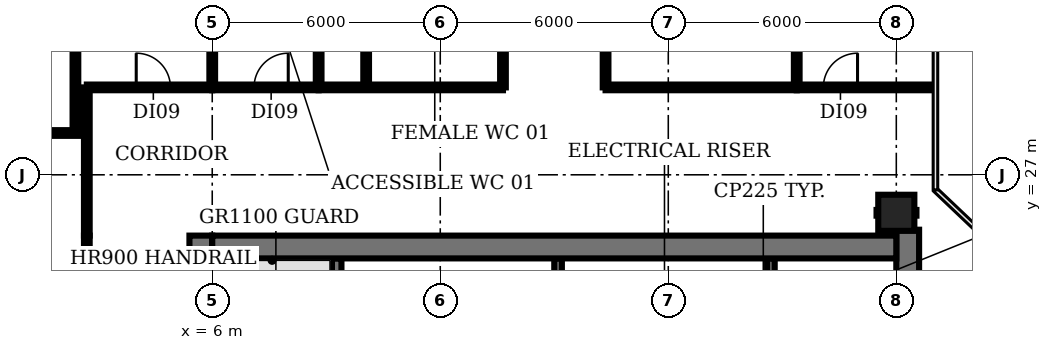
"""IFC4 building model, lengths in metres.
Left out: names, types, materials, properties, quantities, classifications, styles, units other than length and angle.
Written with IfcOpenShell. Run it as: python <this file> out.ifc"""

import sys

from ifc_helpers import new_model, si_unit, direction, frame, frame_2d, origin, origin_2d, place, context, subcontext, project, spatial, rectangle, circle, extrude, element, fill, save


model = new_model("IFC4")
c1 = context("Model", 3, precision=1e-05, world=origin(), true_north=direction((0.0, 1.0)))
c2 = subcontext(c1, "Body", "Model", "MODEL_VIEW")
j1 = project(units=[si_unit("LENGTHUNIT", "METRE"), si_unit("PLANEANGLEUNIT", "RADIAN")], contexts=[c1])
p1 = place(None, origin())
s1 = spatial("IfcSite", under=j1, at=p1, CompositionType="ELEMENT")
p2 = place(p1, origin())
s2 = spatial("IfcBuilding", under=s1, at=p2, CompositionType="ELEMENT")
p3 = place(p2, frame((0.0, 0.0, 176.0)))
s3 = spatial("IfcBuildingStorey", under=s2, at=p3, CompositionType="ELEMENT", Elevation=176.0)
p4 = place(p3, frame((24.0, 26.0, 0.0), z_axis=(0.0, 0.0, 1.0), x_axis=(1.0, 0.0, 0.0)))
e1 = element("IfcColumn", 1, at=p4, inside=s3, PredefinedType="COLUMN", context=c2, shape_type="SweptSolid", body=[
    extrude(circle(Radius=0.475, at=origin_2d()), origin(), (0.0, 0.0, 1.0), 3.85),
])
p5 = place(p3, frame((9.275, 18.375, 0.0), z_axis=(0.0, 0.0, 1.0), x_axis=(0.0, 1.0, 0.0)))
e2 = element("IfcWall", 2, at=p5, inside=s3, PredefinedType="SHEAR", context=c2, shape_type="SweptSolid", body=[
    extrude(rectangle(XDim=6.425, YDim=0.25, at=frame_2d((3.212, 0.0))), origin(), (0.0, 0.0, 1.0), 3.85),
])
for number, where, z_axis, x_axis in (
    (3, (15.1, 22.9, 0.0), (0.0, 0.0, 1.0), (0.0, 1.0, 0.0)),
    (4, (20.7, 22.9, 0.0), (0.0, 0.0, 1.0), (0.0, 1.0, 0.0)),
):
    element("IfcWall", number, at=place(p3, frame(where, z_axis=z_axis, x_axis=x_axis)), inside=s3, PredefinedType="SHEAR", context=c2, shape_type="SweptSolid", body=[
        extrude(rectangle(XDim=1.9, YDim=0.2, at=frame_2d((0.95, 0.0))), origin(), (0.0, 0.0, 1.0), 3.85),
    ])
p6 = place(p3, frame((5.7, 4.8, 0.0), z_axis=(0.0, 0.0, 1.0), x_axis=(0.0, 1.0, 0.0)))
e5 = element("IfcWall", 5, at=p6, inside=s3, PredefinedType="SHEAR", context=c2, shape_type="SweptSolid", body=[
    extrude(rectangle(XDim=20.6, YDim=0.6, at=frame_2d((10.3, 0.0))), origin(), (0.0, 0.0, 1.0), 3.85),
])
p7 = place(p6, frame((0.85, 0.0, 0.0)))
e6 = element("IfcOpeningElement", 6, at=p7, cuts=e5, PredefinedType="OPENING", context=c2, shape_type="SweptSolid", body=[
    extrude(rectangle(XDim=1.5, YDim=2.1, at=frame_2d((0.75, 1.05))), frame((0.0, 0.31, 0.0), z_axis=(0.0, -1.0, 0.0), x_axis=(1.0, 0.0, 0.0)), (0.0, 0.0, 1.0), 0.62),
])
p8 = place(p6, frame((7.3, 0.0, 0.0)))
e7 = element("IfcOpeningElement", 7, at=p8, cuts=e5, PredefinedType="OPENING", context=c2, shape_type="SweptSolid", body=[
    extrude(rectangle(XDim=1.2, YDim=2.1, at=frame_2d((0.6, 1.05))), frame((0.0, 0.31, 0.0), z_axis=(0.0, -1.0, 0.0), x_axis=(1.0, 0.0, 0.0)), (0.0, 0.0, 1.0), 0.62),
])
p9 = place(p6, frame((13.85, 0.0, 0.0)))
e8 = element("IfcOpeningElement", 8, at=p9, cuts=e5, PredefinedType="OPENING", context=c2, shape_type="SweptSolid", body=[
    extrude(rectangle(XDim=1.2, YDim=2.1, at=frame_2d((0.6, 1.05))), frame((0.0, 0.31, 0.0), z_axis=(0.0, -1.0, 0.0), x_axis=(1.0, 0.0, 0.0)), (0.0, 0.0, 1.0), 0.62),
])
p10 = place(p3, frame((24.3, 25.555, 0.0), z_axis=(0.0, 0.0, 1.0), x_axis=(0.0, -1.0, 0.0)))
e9 = element("IfcWall", 9, at=p10, inside=s3, PredefinedType="SHEAR", context=c2, shape_type="SweptSolid", body=[
    extrude(rectangle(XDim=20.755, YDim=0.6, at=frame_2d((10.377, 0.0))), origin(), (0.0, 0.0, 1.0), 3.85),
])
p11 = place(p10, frame((18.405, 0.0, 0.0)))
e10 = element("IfcOpeningElement", 10, at=p11, cuts=e9, PredefinedType="OPENING", context=c2, shape_type="SweptSolid", body=[
    extrude(rectangle(XDim=1.5, YDim=2.1, at=frame_2d((0.75, 1.05))), frame((0.0, 0.31, 0.0), z_axis=(0.0, -1.0, 0.0), x_axis=(1.0, 0.0, 0.0)), (0.0, 0.0, 1.0), 0.62),
])
p12 = place(p10, frame((12.305, 0.0, 0.0)))
e11 = element("IfcOpeningElement", 11, at=p12, cuts=e9, PredefinedType="OPENING", context=c2, shape_type="SweptSolid", body=[
    extrude(rectangle(XDim=0.9, YDim=2.1, at=frame_2d((0.45, 1.05))), frame((0.0, 0.31, 0.0), z_axis=(0.0, -1.0, 0.0), x_axis=(1.0, 0.0, 0.0)), (0.0, 0.0, 1.0), 0.62),
])
p13 = place(p10, frame((6.305, 0.0, 0.0)))
e12 = element("IfcOpeningElement", 12, at=p13, cuts=e9, PredefinedType="OPENING", context=c2, shape_type="SweptSolid", body=[
    extrude(rectangle(XDim=2.0, YDim=2.1, at=frame_2d((1.0, 1.05))), frame((0.0, 0.31, 0.0), z_axis=(0.0, -1.0, 0.0), x_axis=(1.0, 0.0, 0.0)), (0.0, 0.0, 1.0), 0.62),
])
p14 = place(p3, frame((6.0, 25.1, 0.0), z_axis=(0.0, 0.0, 1.0), x_axis=(1.0, 0.0, 0.0)))
e13 = element("IfcWall", 13, at=p14, inside=s3, PredefinedType="SHEAR", context=c2, shape_type="SweptSolid", body=[
    extrude(rectangle(XDim=18.0, YDim=0.6, at=frame_2d((9.0, 0.0))), origin(), (0.0, 0.0, 1.0), 3.85),
])
p15 = place(p3, frame((-0.969, 28.1, 0.0), z_axis=(0.0, 0.0, 1.0), x_axis=(1.0, 0.0, 0.0)))
e14 = element("IfcWall", 14, at=p15, inside=s3, PredefinedType="PARTITIONING", context=c2, shape_type="SweptSolid", body=[
    extrude(rectangle(XDim=3.669, YDim=0.15, at=frame_2d((1.834, 0.0))), origin(), (0.0, 0.0, 1.0), 2.88),
])
p16 = place(p3, frame((2.4, 28.1, 0.0), z_axis=(0.0, 0.0, 1.0), x_axis=(0.0, 1.0, 0.0)))
e15 = element("IfcWall", 15, at=p16, inside=s3, PredefinedType="PARTITIONING", context=c2, shape_type="SweptSolid", body=[
    extrude(rectangle(XDim=6.0, YDim=0.15, at=frame_2d((3.0, 0.0))), origin(), (0.0, 0.0, 1.0), 2.88),
])
p17 = place(p3, frame((2.7, 4.8, 0.0), z_axis=(0.0, 0.0, 1.0), x_axis=(0.0, 1.0, 0.0)))
e16 = element("IfcWall", 16, at=p17, inside=s3, PredefinedType="PARTITIONING", context=c2, shape_type="SweptSolid", body=[
    extrude(rectangle(XDim=20.6, YDim=0.15, at=frame_2d((10.3, 0.0))), origin(), (0.0, 0.0, 1.0), 2.88),
])
p18 = place(p17, frame((10.2, 0.0, 0.0)))
e17 = element("IfcOpeningElement", 17, at=p18, cuts=e16, PredefinedType="OPENING", context=c2, shape_type="SweptSolid", body=[
    extrude(rectangle(XDim=1.2, YDim=2.1, at=frame_2d((0.6, 1.05))), frame((0.0, 0.085, 0.0), z_axis=(0.0, -1.0, 0.0), x_axis=(1.0, 0.0, 0.0)), (0.0, 0.0, 1.0), 0.17),
])
p19 = place(p3, frame((2.7, 25.4, 0.0), z_axis=(0.0, 0.0, 1.0), x_axis=(0.0, 1.0, 0.0)))
e18 = element("IfcWall", 18, at=p19, inside=s3, PredefinedType="PARTITIONING", context=c2, shape_type="SweptSolid", body=[
    extrude(rectangle(XDim=3.9, YDim=0.15, at=frame_2d((1.95, 0.0))), origin(), (0.0, 0.0, 1.0), 2.88),
])
p20 = place(p3, frame((2.7, 29.3, 0.0), z_axis=(0.0, 0.0, 1.0), x_axis=(1.0, 0.0, 0.0)))
e19 = element("IfcWall", 19, at=p20, inside=s3, PredefinedType="PARTITIONING", context=c2, shape_type="SweptSolid", body=[
    extrude(rectangle(XDim=3.3, YDim=0.15, at=frame_2d((1.65, 0.0))), origin(), (0.0, 0.0, 1.0), 2.88),
])
p21 = place(p20, frame((1.3, 0.0, 0.0)))
e20 = element("IfcOpeningElement", 20, at=p21, cuts=e19, PredefinedType="OPENING", context=c2, shape_type="SweptSolid", body=[
    extrude(rectangle(XDim=0.9, YDim=2.1, at=frame_2d((0.45, 1.05))), frame((0.0, 0.085, 0.0), z_axis=(0.0, -1.0, 0.0), x_axis=(1.0, 0.0, 0.0)), (0.0, 0.0, 1.0), 0.17),
])
p22 = place(p3, frame((6.0, 29.3, 0.0), z_axis=(0.0, 0.0, 1.0), x_axis=(0.0, 1.0, 0.0)))
e21 = element("IfcWall", 21, at=p22, inside=s3, PredefinedType="PARTITIONING", context=c2, shape_type="SweptSolid", body=[
    extrude(rectangle(XDim=4.8, YDim=0.15, at=frame_2d((2.4, 0.0))), origin(), (0.0, 0.0, 1.0), 2.88),
])
p23 = place(p3, frame((6.0, 29.3, 0.0), z_axis=(0.0, 0.0, 1.0), x_axis=(1.0, 0.0, 0.0)))
e22 = element("IfcWall", 22, at=p23, inside=s3, PredefinedType="PARTITIONING", context=c2, shape_type="SweptSolid", body=[
    extrude(rectangle(XDim=2.8, YDim=0.15, at=frame_2d((1.4, 0.0))), origin(), (0.0, 0.0, 1.0), 2.88),
])
p24 = place(p23, frame((1.1, 0.0, 0.0)))
e23 = element("IfcOpeningElement", 23, at=p24, cuts=e22, PredefinedType="OPENING", context=c2, shape_type="SweptSolid", body=[
    extrude(rectangle(XDim=0.9, YDim=2.1, at=frame_2d((0.45, 1.05))), frame((0.0, 0.085, 0.0), z_axis=(0.0, -1.0, 0.0), x_axis=(1.0, 0.0, 0.0)), (0.0, 0.0, 1.0), 0.17),
])
p25 = place(p3, frame((8.8, 29.3, 0.0), z_axis=(0.0, 0.0, 1.0), x_axis=(0.0, 1.0, 0.0)))
e24 = element("IfcWall", 24, at=p25, inside=s3, PredefinedType="PARTITIONING", context=c2, shape_type="SweptSolid", body=[
    extrude(rectangle(XDim=4.8, YDim=0.15, at=frame_2d((2.4, 0.0))), origin(), (0.0, 0.0, 1.0), 2.88),
])
p26 = place(p3, frame((8.8, 29.3, 0.0), z_axis=(0.0, 0.0, 1.0), x_axis=(1.0, 0.0, 0.0)))
e25 = element("IfcWall", 25, at=p26, inside=s3, PredefinedType="PARTITIONING", context=c2, shape_type="SweptSolid", body=[
    extrude(rectangle(XDim=4.85, YDim=0.15, at=frame_2d((2.425, 0.0))), origin(), (0.0, 0.0, 1.0), 2.88),
])
p27 = place(p3, frame((10.05, 29.3, 0.0), z_axis=(0.0, 0.0, 1.0), x_axis=(0.0, 1.0, 0.0)))
e26 = element("IfcWall", 26, at=p27, inside=s3, PredefinedType="PARTITIONING", context=c2, shape_type="SweptSolid", body=[
    extrude(rectangle(XDim=4.8, YDim=0.15, at=frame_2d((2.4, 0.0))), origin(), (0.0, 0.0, 1.0), 2.88),
])
p28 = place(p3, frame((13.65, 29.3, 0.0), z_axis=(0.0, 0.0, 1.0), x_axis=(0.0, 1.0, 0.0)))
e27 = element("IfcWall", 27, at=p28, inside=s3, PredefinedType="PARTITIONING", context=c2, shape_type="SweptSolid", body=[
    extrude(rectangle(XDim=4.8, YDim=0.15, at=frame_2d((2.4, 0.0))), origin(), (0.0, 0.0, 1.0), 2.88),
])
p29 = place(p28, frame((1.9, 0.0, 0.0)))
e28 = element("IfcOpeningElement", 28, at=p29, cuts=e27, PredefinedType="OPENING", context=c2, shape_type="SweptSolid", body=[
    extrude(rectangle(XDim=0.9, YDim=2.1, at=frame_2d((0.45, 1.05))), frame((0.0, 0.085, 0.0), z_axis=(0.0, -1.0, 0.0), x_axis=(1.0, 0.0, 0.0)), (0.0, 0.0, 1.0), 0.17),
])
p30 = place(p3, frame((16.35, 29.3, 0.0), z_axis=(0.0, 0.0, 1.0), x_axis=(0.0, 1.0, 0.0)))
e29 = element("IfcWall", 29, at=p30, inside=s3, PredefinedType="PARTITIONING", context=c2, shape_type="SweptSolid", body=[
    extrude(rectangle(XDim=4.8, YDim=0.15, at=frame_2d((2.4, 0.0))), origin(), (0.0, 0.0, 1.0), 2.88),
])
p31 = place(p3, frame((16.35, 29.3, 0.0), z_axis=(0.0, 0.0, 1.0), x_axis=(1.0, 0.0, 0.0)))
e30 = element("IfcWall", 30, at=p31, inside=s3, PredefinedType="PARTITIONING", context=c2, shape_type="SweptSolid", body=[
    extrude(rectangle(XDim=5.03, YDim=0.15, at=frame_2d((2.515, 0.0))), origin(), (0.0, 0.0, 1.0), 2.88),
])
p32 = place(p3, frame((21.38, 29.3, 0.0), z_axis=(0.0, 0.0, 1.0), x_axis=(0.0, 1.0, 0.0)))
e31 = element("IfcWall", 31, at=p32, inside=s3, PredefinedType="PARTITIONING", context=c2, shape_type="SweptSolid", body=[
    extrude(rectangle(XDim=4.8, YDim=0.15, at=frame_2d((2.4, 0.0))), origin(), (0.0, 0.0, 1.0), 2.88),
])
p33 = place(p3, frame((21.38, 29.3, 0.0), z_axis=(0.0, 0.0, 1.0), x_axis=(1.0, 0.0, 0.0)))
e32 = element("IfcWall", 32, at=p33, inside=s3, PredefinedType="PARTITIONING", context=c2, shape_type="SweptSolid", body=[
    extrude(rectangle(XDim=3.6, YDim=0.15, at=frame_2d((1.8, 0.0))), origin(), (0.0, 0.0, 1.0), 2.88),
])
p34 = place(p33, frame((0.7, 0.0, 0.0)))
e33 = element("IfcOpeningElement", 33, at=p34, cuts=e32, PredefinedType="OPENING", context=c2, shape_type="SweptSolid", body=[
    extrude(rectangle(XDim=0.9, YDim=2.1, at=frame_2d((0.45, 1.05))), frame((0.0, 0.085, 0.0), z_axis=(0.0, -1.0, 0.0), x_axis=(1.0, 0.0, 0.0)), (0.0, 0.0, 1.0), 0.17),
])
p35 = place(p3, frame((23.48, 26.0, 0.0), z_axis=(0.0, 0.0, 1.0), x_axis=(1.0, 0.0, 0.0)))
e34 = element("IfcWall", 34, at=p35, inside=s3, PredefinedType="PARTITIONING", context=c2, shape_type="SweptSolid", body=[
    extrude(rectangle(XDim=1.05, YDim=0.15, at=frame_2d((0.525, 0.0))), origin(), (0.0, 0.0, 1.0), 2.88),
])
p36 = place(p21, origin())
e35 = element("IfcDoor", 35, at=p36, inside=s3, OperationType="SINGLE_SWING_LEFT", PredefinedType="DOOR", context=c2, shape_type="SweptSolid", body=[
    extrude(rectangle(XDim=0.9, YDim=2.1, at=frame_2d((0.45, 1.05))), frame((0.0, 0.025, 0.0), z_axis=(0.0, -1.0, 0.0), x_axis=(1.0, 0.0, 0.0)), (0.0, 0.0, 1.0), 0.05),
])
fill(e20, e35)
p37 = place(p24, origin())
e36 = element("IfcDoor", 36, at=p37, inside=s3, OperationType="SINGLE_SWING_RIGHT", PredefinedType="DOOR", context=c2, shape_type="SweptSolid", body=[
    extrude(rectangle(XDim=0.9, YDim=2.1, at=frame_2d((0.45, 1.05))), frame((0.0, 0.025, 0.0), z_axis=(0.0, -1.0, 0.0), x_axis=(1.0, 0.0, 0.0)), (0.0, 0.0, 1.0), 0.05),
])
fill(e23, e36)
p38 = place(p34, origin())
e37 = element("IfcDoor", 37, at=p38, inside=s3, OperationType="SINGLE_SWING_RIGHT", PredefinedType="DOOR", context=c2, shape_type="SweptSolid", body=[
    extrude(rectangle(XDim=0.9, YDim=2.1, at=frame_2d((0.45, 1.05))), frame((0.0, 0.025, 0.0), z_axis=(0.0, -1.0, 0.0), x_axis=(1.0, 0.0, 0.0)), (0.0, 0.0, 1.0), 0.05),
])
fill(e33, e37)
save(model, sys.argv[1])
